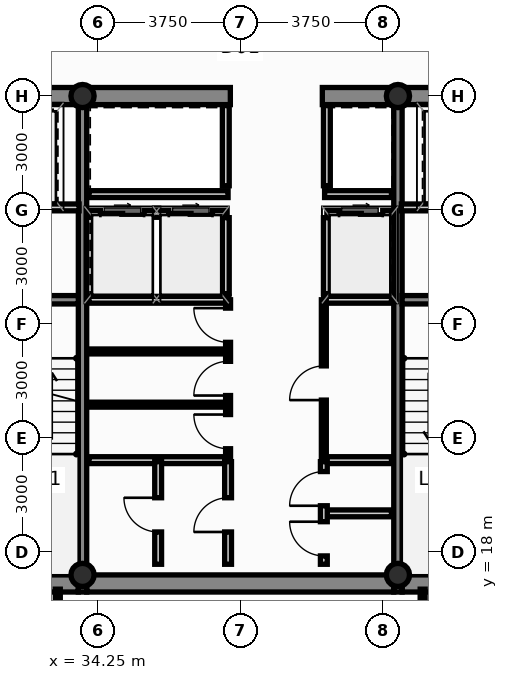
"""IFC4 building model, lengths in metres.
Left out: names, types, materials, properties, quantities, classifications, styles, units other than length and angle.
Written with IfcOpenShell. Run it as: python <this file> out.ifc"""

import sys

from ifc_helpers import new_model, si_unit, direction, frame, frame_2d, origin, origin_2d, place, context, subcontext, project, spatial, rectangle, hollow_circle, extrude, source, transform, mapped, element, fill, save


model = new_model("IFC4")
c1 = context("Model", 3, precision=1e-05, world=origin(), true_north=direction((0.0, 1.0)))
c2 = subcontext(c1, "Body", "Model", "MODEL_VIEW")
j1 = project(units=[si_unit("LENGTHUNIT", "METRE"), si_unit("PLANEANGLEUNIT", "RADIAN")], contexts=[c1])
p1 = place(None, origin())
s1 = spatial("IfcSite", under=j1, at=p1, CompositionType="ELEMENT")
p2 = place(p1, origin())
s2 = spatial("IfcBuilding", under=s1, at=p2, CompositionType="ELEMENT")
p3 = place(p2, frame((0.0, 0.0, 162.15)))
s3 = spatial("IfcBuildingStorey", under=s2, at=p3, CompositionType="ELEMENT", Elevation=162.15)
m1 = source(origin(), c2, "Body", "SweptSolid", [
    extrude(hollow_circle(Radius=0.305, WallThickness=0.025, at=origin_2d()), origin(), (0.0, 0.0, 1.0), 3.65),
])
for number, where, z_axis, x_axis in (
    (1, (33.85, 17.4, 0.0), (0.0, 0.0, 1.0), (1.0, 0.0, 0.0)),
    (2, (42.15, 17.4, 0.0), (0.0, 0.0, 1.0), (1.0, 0.0, 0.0)),
    (3, (33.85, 30.0, 0.0), (0.0, 0.0, 1.0), (1.0, 0.0, 0.0)),
    (4, (42.15, 30.0, 0.0), (0.0, 0.0, 1.0), (1.0, 0.0, 0.0)),
):
    element("IfcColumn", number, at=place(p3, frame(where, z_axis=z_axis, x_axis=x_axis)), inside=s3, PredefinedType="COLUMN", context=c2, shape_type="MappedRepresentation", body=[
        mapped(m1, transform((0.0, 0.0, 0.0), scale=1.0)),
    ])
p4 = place(p3, frame((30.84, 17.175, 0.0), z_axis=(0.0, 0.0, 1.0), x_axis=(1.0, 0.0, 0.0)))
e5 = element("IfcWall", 5, at=p4, inside=s3, PredefinedType="SHEAR", context=c2, shape_type="SweptSolid", body=[
    extrude(rectangle(XDim=2.9, YDim=0.45, at=frame_2d((1.45, 0.0))), origin(), (0.0, 0.0, 1.0), 3.65),
])
p5 = place(p3, frame((33.96, 17.175, 0.0), z_axis=(0.0, 0.0, 1.0), x_axis=(1.0, 0.0, 0.0)))
e6 = element("IfcWall", 6, at=p5, inside=s3, PredefinedType="SHEAR", context=c2, shape_type="SweptSolid", body=[
    extrude(rectangle(XDim=8.08, YDim=0.45, at=frame_2d((4.04, 0.0))), origin(), (0.0, 0.0, 1.0), 3.65),
])
for number, where, z_axis, x_axis in (
    (7, (42.26, 17.175, 0.0), (0.0, 0.0, 1.0), (1.0, 0.0, 0.0)),
    (8, (30.84, 30.0, 0.0), (0.0, 0.0, 1.0), (1.0, 0.0, 0.0)),
):
    element("IfcWall", number, at=place(p3, frame(where, z_axis=z_axis, x_axis=x_axis)), inside=s3, PredefinedType="SHEAR", context=c2, shape_type="SweptSolid", body=[
        extrude(rectangle(XDim=2.9, YDim=0.45, at=frame_2d((1.45, 0.0))), origin(), (0.0, 0.0, 1.0), 3.65),
    ])
p6 = place(p3, frame((33.96, 30.0, 0.0), z_axis=(0.0, 0.0, 1.0), x_axis=(1.0, 0.0, 0.0)))
e9 = element("IfcWall", 9, at=p6, inside=s3, PredefinedType="SHEAR", context=c2, shape_type="SweptSolid", body=[
    extrude(rectangle(XDim=3.78, YDim=0.45, at=frame_2d((1.89, 0.0))), origin(), (0.0, 0.0, 1.0), 3.65),
])
p7 = place(p3, frame((40.16, 30.0, 0.0), z_axis=(0.0, 0.0, 1.0), x_axis=(1.0, 0.0, 0.0)))
e10 = element("IfcWall", 10, at=p7, inside=s3, PredefinedType="SHEAR", context=c2, shape_type="SweptSolid", body=[
    extrude(rectangle(XDim=1.88, YDim=0.45, at=frame_2d((0.94, 0.0))), origin(), (0.0, 0.0, 1.0), 3.65),
])
p8 = place(p3, frame((42.26, 30.0, 0.0), z_axis=(0.0, 0.0, 1.0), x_axis=(1.0, 0.0, 0.0)))
e11 = element("IfcWall", 11, at=p8, inside=s3, PredefinedType="SHEAR", context=c2, shape_type="SweptSolid", body=[
    extrude(rectangle(XDim=2.9, YDim=0.45, at=frame_2d((1.45, 0.0))), origin(), (0.0, 0.0, 1.0), 3.65),
])
for number, where, z_axis, x_axis in (
    (12, (33.85, 16.95, 0.0), (0.0, 0.0, 1.0), (0.0, 1.0, 0.0)),
    (13, (42.15, 16.95, 0.0), (0.0, 0.0, 1.0), (0.0, 1.0, 0.0)),
):
    element("IfcWall", number, at=place(p3, frame(where, z_axis=z_axis, x_axis=x_axis)), inside=s3, PredefinedType="SHEAR", context=c2, shape_type="SweptSolid", body=[
        extrude(rectangle(XDim=13.275, YDim=0.22, at=frame_2d((6.638, 0.0))), origin(), (0.0, 0.0, 1.0), 3.65),
    ])
for number, where, z_axis, x_axis in (
    (14, (30.84, 24.64, 0.0), (0.0, 0.0, 1.0), (1.0, 0.0, 0.0)),
    (15, (42.26, 24.64, 0.0), (0.0, 0.0, 1.0), (1.0, 0.0, 0.0)),
):
    element("IfcWall", number, at=place(p3, frame(where, z_axis=z_axis, x_axis=x_axis)), inside=s3, PredefinedType="SHEAR", context=c2, shape_type="SweptSolid", body=[
        extrude(rectangle(XDim=2.9, YDim=0.22, at=frame_2d((1.45, 0.0))), origin(), (0.0, 0.0, 1.0), 3.65),
    ])
p9 = place(p3, frame((34.02, 26.9, 0.0), z_axis=(0.0, 0.0, 1.0), x_axis=(1.0, 0.0, 0.0)))
e16 = element("IfcWall", 16, at=p9, inside=s3, PredefinedType="PARTITIONING", context=c2, shape_type="SweptSolid", body=[
    extrude(rectangle(XDim=3.6, YDim=0.18, at=frame_2d((1.8, 0.0))), origin(), (0.0, 0.0, 1.0), 3.4),
])
p10 = place(p9, frame((0.3, 0.0, 0.0)))
e17 = element("IfcOpeningElement", 17, at=p10, cuts=e16, PredefinedType="OPENING", context=c2, shape_type="SweptSolid", body=[
    extrude(rectangle(XDim=1.15, YDim=2.2, at=frame_2d((0.575, 1.1))), frame((0.0, 0.102, 0.0), z_axis=(0.0, -1.0, 0.0), x_axis=(1.0, 0.0, 0.0)), (0.0, 0.0, 1.0), 0.204),
])
p11 = place(p9, frame((2.1, 0.0, 0.0)))
e18 = element("IfcOpeningElement", 18, at=p11, cuts=e16, PredefinedType="OPENING", context=c2, shape_type="SweptSolid", body=[
    extrude(rectangle(XDim=1.15, YDim=2.2, at=frame_2d((0.575, 1.1))), frame((0.0, 0.102, 0.0), z_axis=(0.0, -1.0, 0.0), x_axis=(1.0, 0.0, 0.0)), (0.0, 0.0, 1.0), 0.204),
])
p12 = place(p3, frame((40.28, 26.9, 0.0), z_axis=(0.0, 0.0, 1.0), x_axis=(1.0, 0.0, 0.0)))
e19 = element("IfcWall", 19, at=p12, inside=s3, PredefinedType="PARTITIONING", context=c2, shape_type="SweptSolid", body=[
    extrude(rectangle(XDim=1.7, YDim=0.18, at=frame_2d((0.85, 0.0))), origin(), (0.0, 0.0, 1.0), 3.4),
])
p13 = place(p12, frame((0.32, 0.0, 0.0)))
e20 = element("IfcOpeningElement", 20, at=p13, cuts=e19, PredefinedType="OPENING", context=c2, shape_type="SweptSolid", body=[
    extrude(rectangle(XDim=1.15, YDim=2.2, at=frame_2d((0.575, 1.1))), frame((0.0, 0.102, 0.0), z_axis=(0.0, -1.0, 0.0), x_axis=(1.0, 0.0, 0.0)), (0.0, 0.0, 1.0), 0.204),
])
for number, where, z_axis, x_axis in (
    (21, (37.62, 24.8, 0.0), (0.0, 0.0, 1.0), (0.0, 1.0, 0.0)),
    (22, (40.28, 24.8, 0.0), (0.0, 0.0, 1.0), (0.0, 1.0, 0.0)),
):
    element("IfcWall", number, at=place(p3, frame(where, z_axis=z_axis, x_axis=x_axis)), inside=s3, PredefinedType="PARTITIONING", context=c2, shape_type="SweptSolid", body=[
        extrude(rectangle(XDim=2.0, YDim=0.18, at=frame_2d((1.0, 0.0))), origin(), (0.0, 0.0, 1.0), 3.4),
    ])
p14 = place(p3, frame((34.02, 24.64, 0.0), z_axis=(0.0, 0.0, 1.0), x_axis=(1.0, 0.0, 0.0)))
e23 = element("IfcWall", 23, at=p14, inside=s3, PredefinedType="PARTITIONING", context=c2, shape_type="SweptSolid", body=[
    extrude(rectangle(XDim=3.68, YDim=0.18, at=frame_2d((1.84, 0.0))), origin(), (0.0, 0.0, 1.0), 3.4),
])
p15 = place(p3, frame((40.2, 24.64, 0.0), z_axis=(0.0, 0.0, 1.0), x_axis=(1.0, 0.0, 0.0)))
e24 = element("IfcWall", 24, at=p15, inside=s3, PredefinedType="PARTITIONING", context=c2, shape_type="SweptSolid", body=[
    extrude(rectangle(XDim=1.78, YDim=0.18, at=frame_2d((0.89, 0.0))), origin(), (0.0, 0.0, 1.0), 3.4),
])
p16 = place(p3, frame((34.02, 27.42, 0.0), z_axis=(0.0, 0.0, 1.0), x_axis=(1.0, 0.0, 0.0)))
e25 = element("IfcWall", 25, at=p16, inside=s3, PredefinedType="PARTITIONING", context=c2, shape_type="SweptSolid", body=[
    extrude(rectangle(XDim=3.66, YDim=0.18, at=frame_2d((1.83, 0.0))), origin(), (0.0, 0.0, 1.0), 3.4),
])
p17 = place(p3, frame((40.22, 27.42, 0.0), z_axis=(0.0, 0.0, 1.0), x_axis=(1.0, 0.0, 0.0)))
e26 = element("IfcWall", 26, at=p17, inside=s3, PredefinedType="PARTITIONING", context=c2, shape_type="SweptSolid", body=[
    extrude(rectangle(XDim=1.76, YDim=0.18, at=frame_2d((0.88, 0.0))), origin(), (0.0, 0.0, 1.0), 3.4),
])
for number, where, z_axis, x_axis in (
    (27, (37.62, 27.64, 0.0), (0.0, 0.0, 1.0), (0.0, 1.0, 0.0)),
    (28, (40.28, 27.64, 0.0), (0.0, 0.0, 1.0), (0.0, 1.0, 0.0)),
):
    element("IfcWall", number, at=place(p3, frame(where, z_axis=z_axis, x_axis=x_axis)), inside=s3, PredefinedType="PARTITIONING", context=c2, shape_type="SweptSolid", body=[
        extrude(rectangle(XDim=2.11, YDim=0.18, at=frame_2d((1.055, 0.0))), origin(), (0.0, 0.0, 1.0), 3.4),
    ])
for number, where, z_axis, x_axis in (
    (29, (30.86, 27.07, 0.0), (0.0, 0.0, 1.0), (1.0, 0.0, 0.0)),
    (30, (42.24, 27.07, 0.0), (0.0, 0.0, 1.0), (1.0, 0.0, 0.0)),
):
    element("IfcWall", number, at=place(p3, frame(where, z_axis=z_axis, x_axis=x_axis)), inside=s3, PredefinedType="PARTITIONING", context=c2, shape_type="SweptSolid", body=[
        extrude(rectangle(XDim=2.9, YDim=0.18, at=frame_2d((1.45, 0.0))), origin(), (0.0, 0.0, 1.0), 3.4),
    ])
p18 = place(p3, frame((34.02, 20.42, 0.0), z_axis=(0.0, 0.0, 1.0), x_axis=(1.0, 0.0, 0.0)))
e31 = element("IfcWall", 31, at=p18, inside=s3, PredefinedType="PARTITIONING", context=c2, shape_type="SweptSolid", body=[
    extrude(rectangle(XDim=3.64, YDim=0.18, at=frame_2d((1.82, 0.0))), origin(), (0.0, 0.0, 1.0), 3.4),
])
p19 = place(p3, frame((40.22, 20.42, 0.0), z_axis=(0.0, 0.0, 1.0), x_axis=(1.0, 0.0, 0.0)))
e32 = element("IfcWall", 32, at=p19, inside=s3, PredefinedType="PARTITIONING", context=c2, shape_type="SweptSolid", body=[
    extrude(rectangle(XDim=1.76, YDim=0.18, at=frame_2d((0.88, 0.0))), origin(), (0.0, 0.0, 1.0), 3.4),
])
for number, where, z_axis, x_axis in (
    (33, (34.02, 21.88, 0.0), (0.0, 0.0, 1.0), (1.0, 0.0, 0.0)),
    (34, (34.02, 23.28, 0.0), (0.0, 0.0, 1.0), (1.0, 0.0, 0.0)),
):
    element("IfcWall", number, at=place(p3, frame(where, z_axis=z_axis, x_axis=x_axis)), inside=s3, PredefinedType="PARTITIONING", context=c2, shape_type="SweptSolid", body=[
        extrude(rectangle(XDim=3.58, YDim=0.13, at=frame_2d((1.79, 0.0))), origin(), (0.0, 0.0, 1.0), 3.4),
    ])
p20 = place(p3, frame((37.68, 20.5, 0.0), z_axis=(0.0, 0.0, 1.0), x_axis=(0.0, 1.0, 0.0)))
e35 = element("IfcWall", 35, at=p20, inside=s3, PredefinedType="PARTITIONING", context=c2, shape_type="SweptSolid", body=[
    extrude(rectangle(XDim=4.14, YDim=0.13, at=frame_2d((2.07, 0.0))), origin(), (0.0, 0.0, 1.0), 3.4),
])
p21 = place(p20, frame((0.22, 0.0, 0.0)))
e36 = element("IfcOpeningElement", 36, at=p21, cuts=e35, PredefinedType="OPENING", context=c2, shape_type="SweptSolid", body=[
    extrude(rectangle(XDim=0.9, YDim=2.1, at=frame_2d((0.45, 1.05))), frame((0.0, 0.077, 0.0), z_axis=(0.0, -1.0, 0.0), x_axis=(1.0, 0.0, 0.0)), (0.0, 0.0, 1.0), 0.154),
])
p22 = place(p20, frame((1.62, 0.0, 0.0)))
e37 = element("IfcOpeningElement", 37, at=p22, cuts=e35, PredefinedType="OPENING", context=c2, shape_type="SweptSolid", body=[
    extrude(rectangle(XDim=0.9, YDim=2.1, at=frame_2d((0.45, 1.05))), frame((0.0, 0.077, 0.0), z_axis=(0.0, -1.0, 0.0), x_axis=(1.0, 0.0, 0.0)), (0.0, 0.0, 1.0), 0.154),
])
p23 = place(p20, frame((3.02, 0.0, 0.0)))
e38 = element("IfcOpeningElement", 38, at=p23, cuts=e35, PredefinedType="OPENING", context=c2, shape_type="SweptSolid", body=[
    extrude(rectangle(XDim=0.9, YDim=2.1, at=frame_2d((0.45, 1.05))), frame((0.0, 0.077, 0.0), z_axis=(0.0, -1.0, 0.0), x_axis=(1.0, 0.0, 0.0)), (0.0, 0.0, 1.0), 0.154),
])
p24 = place(p3, frame((40.2, 20.5, 0.0), z_axis=(0.0, 0.0, 1.0), x_axis=(0.0, 1.0, 0.0)))
e39 = element("IfcWall", 39, at=p24, inside=s3, PredefinedType="PARTITIONING", context=c2, shape_type="SweptSolid", body=[
    extrude(rectangle(XDim=4.14, YDim=0.13, at=frame_2d((2.07, 0.0))), origin(), (0.0, 0.0, 1.0), 3.4),
])
p25 = place(p24, frame((1.5, 0.0, 0.0)))
e40 = element("IfcOpeningElement", 40, at=p25, cuts=e39, PredefinedType="OPENING", context=c2, shape_type="SweptSolid", body=[
    extrude(rectangle(XDim=0.9, YDim=2.1, at=frame_2d((0.45, 1.05))), frame((0.0, 0.077, 0.0), z_axis=(0.0, -1.0, 0.0), x_axis=(1.0, 0.0, 0.0)), (0.0, 0.0, 1.0), 0.154),
])
p26 = place(p3, frame((35.84, 17.68, 0.0), z_axis=(0.0, 0.0, 1.0), x_axis=(0.0, 1.0, 0.0)))
e41 = element("IfcWall", 41, at=p26, inside=s3, PredefinedType="PARTITIONING", context=c2, shape_type="SweptSolid", body=[
    extrude(rectangle(XDim=2.7, YDim=0.18, at=frame_2d((1.35, 0.0))), origin(), (0.0, 0.0, 1.0), 3.4),
])
p27 = place(p26, frame((0.85, 0.0, 0.0)))
e42 = element("IfcOpeningElement", 42, at=p27, cuts=e41, PredefinedType="OPENING", context=c2, shape_type="SweptSolid", body=[
    extrude(rectangle(XDim=0.9, YDim=2.1, at=frame_2d((0.45, 1.05))), frame((0.0, 0.102, 0.0), z_axis=(0.0, -1.0, 0.0), x_axis=(1.0, 0.0, 0.0)), (0.0, 0.0, 1.0), 0.204),
])
p28 = place(p3, frame((37.68, 17.68, 0.0), z_axis=(0.0, 0.0, 1.0), x_axis=(0.0, 1.0, 0.0)))
e43 = element("IfcWall", 43, at=p28, inside=s3, PredefinedType="PARTITIONING", context=c2, shape_type="SweptSolid", body=[
    extrude(rectangle(XDim=2.7, YDim=0.18, at=frame_2d((1.35, 0.0))), origin(), (0.0, 0.0, 1.0), 3.4),
])
p29 = place(p28, frame((0.85, 0.0, 0.0)))
e44 = element("IfcOpeningElement", 44, at=p29, cuts=e43, PredefinedType="OPENING", context=c2, shape_type="SweptSolid", body=[
    extrude(rectangle(XDim=0.9, YDim=2.1, at=frame_2d((0.45, 1.05))), frame((0.0, 0.102, 0.0), z_axis=(0.0, -1.0, 0.0), x_axis=(1.0, 0.0, 0.0)), (0.0, 0.0, 1.0), 0.204),
])
p30 = place(p3, frame((40.28, 19.02, 0.0), z_axis=(0.0, 0.0, 1.0), x_axis=(1.0, 0.0, 0.0)))
e45 = element("IfcWall", 45, at=p30, inside=s3, PredefinedType="PARTITIONING", context=c2, shape_type="SweptSolid", body=[
    extrude(rectangle(XDim=1.7, YDim=0.18, at=frame_2d((0.85, 0.0))), origin(), (0.0, 0.0, 1.0), 3.4),
])
p31 = place(p3, frame((40.2, 17.68, 0.0), z_axis=(0.0, 0.0, 1.0), x_axis=(0.0, 1.0, 0.0)))
e46 = element("IfcWall", 46, at=p31, inside=s3, PredefinedType="PARTITIONING", context=c2, shape_type="SweptSolid", body=[
    extrude(rectangle(XDim=2.7, YDim=0.18, at=frame_2d((1.35, 0.0))), origin(), (0.0, 0.0, 1.0), 3.4),
])
p32 = place(p31, frame((0.22, 0.0, 0.0)))
e47 = element("IfcOpeningElement", 47, at=p32, cuts=e46, PredefinedType="OPENING", context=c2, shape_type="SweptSolid", body=[
    extrude(rectangle(XDim=0.9, YDim=2.1, at=frame_2d((0.45, 1.05))), frame((0.0, 0.102, 0.0), z_axis=(0.0, -1.0, 0.0), x_axis=(1.0, 0.0, 0.0)), (0.0, 0.0, 1.0), 0.204),
])
p33 = place(p31, frame((1.54, 0.0, 0.0)))
e48 = element("IfcOpeningElement", 48, at=p33, cuts=e46, PredefinedType="OPENING", context=c2, shape_type="SweptSolid", body=[
    extrude(rectangle(XDim=0.9, YDim=2.1, at=frame_2d((0.45, 1.05))), frame((0.0, 0.102, 0.0), z_axis=(0.0, -1.0, 0.0), x_axis=(1.0, 0.0, 0.0)), (0.0, 0.0, 1.0), 0.204),
])
for number, where, z_axis, x_axis in (
    (49, (33.2, 13.555, 0.0), (0.0, 0.0, 1.0), (0.0, 1.0, 0.0)),
    (50, (42.8, 13.555, 0.0), (0.0, 0.0, 1.0), (0.0, 1.0, 0.0)),
):
    element("IfcWall", number, at=place(p3, frame(where, z_axis=z_axis, x_axis=x_axis)), inside=s3, PredefinedType="PARTITIONING", context=c2, shape_type="SweptSolid", body=[
        extrude(rectangle(XDim=3.47, YDim=0.13, at=frame_2d((1.735, 0.0))), origin(), (0.0, 0.0, 1.0), 3.4),
    ])
p34 = place(p10, origin())
e51 = element("IfcDoor", 51, at=p34, inside=s3, OperationType="SLIDING_TO_LEFT", PredefinedType="DOOR", context=c2, shape_type="SweptSolid", body=[
    extrude(rectangle(XDim=1.15, YDim=2.2, at=frame_2d((0.575, 1.1))), frame((0.0, 0.025, 0.0), z_axis=(0.0, -1.0, 0.0), x_axis=(1.0, 0.0, 0.0)), (0.0, 0.0, 1.0), 0.05),
])
fill(e17, e51)
p35 = place(p11, origin())
e52 = element("IfcDoor", 52, at=p35, inside=s3, OperationType="SLIDING_TO_RIGHT", PredefinedType="DOOR", context=c2, shape_type="SweptSolid", body=[
    extrude(rectangle(XDim=1.15, YDim=2.2, at=frame_2d((0.575, 1.1))), frame((0.0, 0.025, 0.0), z_axis=(0.0, -1.0, 0.0), x_axis=(1.0, 0.0, 0.0)), (0.0, 0.0, 1.0), 0.05),
])
fill(e18, e52)
p36 = place(p13, origin())
e53 = element("IfcDoor", 53, at=p36, inside=s3, OperationType="SLIDING_TO_LEFT", PredefinedType="DOOR", context=c2, shape_type="SweptSolid", body=[
    extrude(rectangle(XDim=1.15, YDim=2.2, at=frame_2d((0.575, 1.1))), frame((0.0, 0.025, 0.0), z_axis=(0.0, -1.0, 0.0), x_axis=(1.0, 0.0, 0.0)), (0.0, 0.0, 1.0), 0.05),
])
fill(e20, e53)
p37 = place(p21, origin())
e54 = element("IfcDoor", 54, at=p37, inside=s3, OperationType="SINGLE_SWING_RIGHT", PredefinedType="DOOR", context=c2, shape_type="SweptSolid", body=[
    extrude(rectangle(XDim=0.9, YDim=2.1, at=frame_2d((0.45, 1.05))), frame((0.0, 0.025, 0.0), z_axis=(0.0, -1.0, 0.0), x_axis=(1.0, 0.0, 0.0)), (0.0, 0.0, 1.0), 0.05),
])
fill(e36, e54)
p38 = place(p22, origin())
e55 = element("IfcDoor", 55, at=p38, inside=s3, OperationType="SINGLE_SWING_LEFT", PredefinedType="DOOR", context=c2, shape_type="SweptSolid", body=[
    extrude(rectangle(XDim=0.9, YDim=2.1, at=frame_2d((0.45, 1.05))), frame((0.0, 0.025, 0.0), z_axis=(0.0, -1.0, 0.0), x_axis=(1.0, 0.0, 0.0)), (0.0, 0.0, 1.0), 0.05),
])
fill(e37, e55)
p39 = place(p23, origin())
e56 = element("IfcDoor", 56, at=p39, inside=s3, OperationType="SINGLE_SWING_RIGHT", PredefinedType="DOOR", context=c2, shape_type="SweptSolid", body=[
    extrude(rectangle(XDim=0.9, YDim=2.1, at=frame_2d((0.45, 1.05))), frame((0.0, 0.025, 0.0), z_axis=(0.0, -1.0, 0.0), x_axis=(1.0, 0.0, 0.0)), (0.0, 0.0, 1.0), 0.05),
])
fill(e38, e56)
p40 = place(p25, origin())
e57 = element("IfcDoor", 57, at=p40, inside=s3, OperationType="SINGLE_SWING_LEFT", PredefinedType="DOOR", context=c2, shape_type="SweptSolid", body=[
    extrude(rectangle(XDim=0.9, YDim=2.1, at=frame_2d((0.45, 1.05))), frame((0.0, 0.025, 0.0), z_axis=(0.0, -1.0, 0.0), x_axis=(1.0, 0.0, 0.0)), (0.0, 0.0, 1.0), 0.05),
])
fill(e40, e57)
p41 = place(p27, origin())
e58 = element("IfcDoor", 58, at=p41, inside=s3, OperationType="SINGLE_SWING_RIGHT", PredefinedType="DOOR", context=c2, shape_type="SweptSolid", body=[
    extrude(rectangle(XDim=0.9, YDim=2.1, at=frame_2d((0.45, 1.05))), frame((0.0, 0.025, 0.0), z_axis=(0.0, -1.0, 0.0), x_axis=(1.0, 0.0, 0.0)), (0.0, 0.0, 1.0), 0.05),
])
fill(e42, e58)
p42 = place(p29, origin())
e59 = element("IfcDoor", 59, at=p42, inside=s3, OperationType="SINGLE_SWING_LEFT", PredefinedType="DOOR", context=c2, shape_type="SweptSolid", body=[
    extrude(rectangle(XDim=0.9, YDim=2.1, at=frame_2d((0.45, 1.05))), frame((0.0, 0.025, 0.0), z_axis=(0.0, -1.0, 0.0), x_axis=(1.0, 0.0, 0.0)), (0.0, 0.0, 1.0), 0.05),
])
fill(e44, e59)
p43 = place(p32, origin())
e60 = element("IfcDoor", 60, at=p43, inside=s3, OperationType="SINGLE_SWING_RIGHT", PredefinedType="DOOR", context=c2, shape_type="SweptSolid", body=[
    extrude(rectangle(XDim=0.9, YDim=2.1, at=frame_2d((0.45, 1.05))), frame((0.0, 0.025, 0.0), z_axis=(0.0, -1.0, 0.0), x_axis=(1.0, 0.0, 0.0)), (0.0, 0.0, 1.0), 0.05),
])
fill(e47, e60)
p44 = place(p33, origin())
e61 = element("IfcDoor", 61, at=p44, inside=s3, OperationType="SINGLE_SWING_LEFT", PredefinedType="DOOR", context=c2, shape_type="SweptSolid", body=[
    extrude(rectangle(XDim=0.9, YDim=2.1, at=frame_2d((0.45, 1.05))), frame((0.0, 0.025, 0.0), z_axis=(0.0, -1.0, 0.0), x_axis=(1.0, 0.0, 0.0)), (0.0, 0.0, 1.0), 0.05),
])
fill(e48, e61)
save(model, sys.argv[1])
